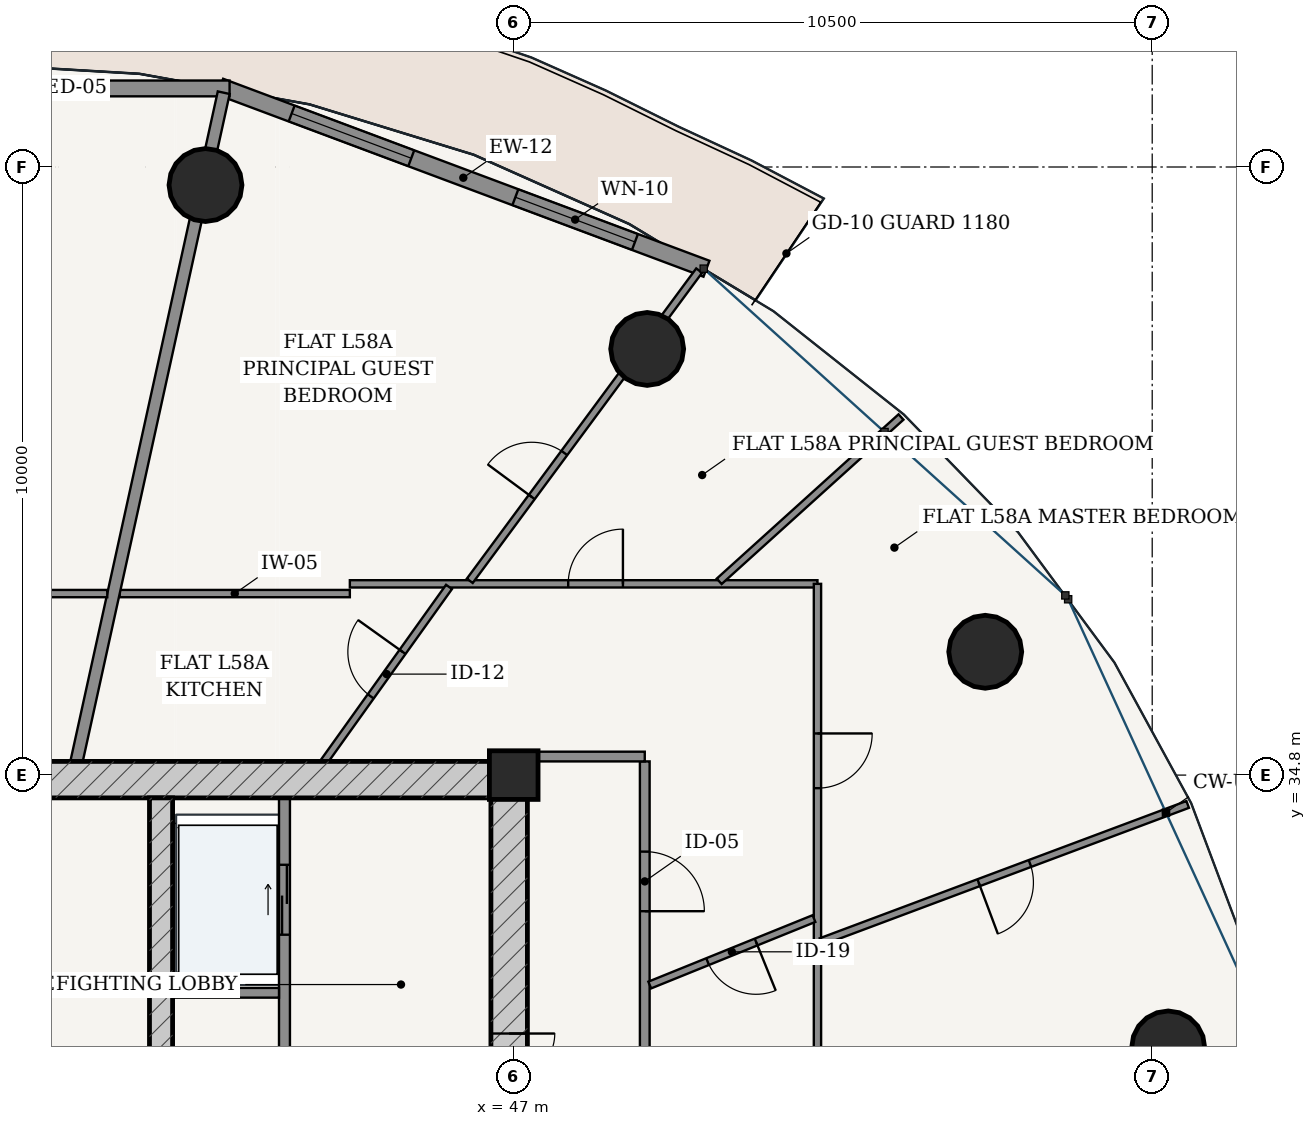
"""IFC4 building model, lengths in metres.
Left out: names, types, materials, properties, quantities, classifications, styles, units other than length and angle.
Written with IfcOpenShell. Run it as: python <this file> out.ifc"""

import sys

from ifc_helpers import new_model, si_unit, direction, frame, frame_2d, origin, origin_2d, place, context, subcontext, project, spatial, rectangle, hollow_circle, extrude, source, transform, mapped, element, fill, save


model = new_model("IFC4")
c1 = context("Model", 3, precision=1e-05, world=origin(), true_north=direction((-0.2419218956, 0.970295726276)))
c2 = subcontext(c1, "Body", "Model", "MODEL_VIEW")
j1 = project(units=[si_unit("LENGTHUNIT", "METRE"), si_unit("PLANEANGLEUNIT", "RADIAN")], contexts=[c1])
p1 = place(None, origin())
s1 = spatial("IfcSite", under=j1, at=p1, CompositionType="ELEMENT")
p2 = place(p1, origin())
s2 = spatial("IfcBuilding", under=s1, at=p2, CompositionType="ELEMENT")
p3 = place(p2, frame((0.0, 0.0, 220.8)))
s3 = spatial("IfcBuildingStorey", under=s2, at=p3, CompositionType="ELEMENT", Elevation=220.8)
p4 = place(p3, frame((47.0, 34.8, 0.0), z_axis=(0.0, 0.0, 1.0), x_axis=(1.0, 0.0, 0.0)))
e1 = element("IfcColumn", 1, at=p4, inside=s3, PredefinedType="COLUMN", context=c2, shape_type="SweptSolid", body=[
    extrude(rectangle(XDim=0.8, YDim=0.8, at=origin_2d()), origin(), (0.0, 0.0, 1.0), 3.7),
])
p5 = place(p3, frame((28.775, 34.725, 0.0), z_axis=(0.0, 0.0, 1.0), x_axis=(1.0, 0.0, 0.0)))
e2 = element("IfcWall", 2, at=p5, inside=s3, PredefinedType="SHEAR", context=c2, shape_type="SweptSolid", body=[
    extrude(rectangle(XDim=18.45, YDim=0.6, at=frame_2d((9.225, 0.0))), origin(), (0.0, 0.0, 1.0), 3.435),
])
p6 = place(p3, frame((46.925, 19.175, 0.0), z_axis=(0.0, 0.0, 1.0), x_axis=(0.0, 1.0, 0.0)))
e3 = element("IfcWall", 3, at=p6, inside=s3, PredefinedType="SHEAR", context=c2, shape_type="SweptSolid", body=[
    extrude(rectangle(XDim=15.25, YDim=0.6, at=frame_2d((7.625, 0.0))), origin(), (0.0, 0.0, 1.0), 3.435),
])
p7 = place(p6, frame((9.875, 0.0, 0.0)))
e4 = element("IfcOpeningElement", 4, at=p7, cuts=e3, PredefinedType="OPENING", context=c2, shape_type="SweptSolid", body=[
    extrude(rectangle(XDim=1.5, YDim=2.2, at=frame_2d((0.75, 1.1))), frame((0.0, 0.31, 0.0), z_axis=(0.0, -1.0, 0.0), x_axis=(1.0, 0.0, 0.0)), (0.0, 0.0, 1.0), 0.62),
])
p8 = place(p3, frame((41.2, 19.175, 0.0), z_axis=(0.0, 0.0, 1.0), x_axis=(0.0, 1.0, 0.0)))
e5 = element("IfcWall", 5, at=p8, inside=s3, PredefinedType="SHEAR", context=c2, shape_type="SweptSolid", body=[
    extrude(rectangle(XDim=15.25, YDim=0.38, at=frame_2d((7.625, 0.0))), origin(), (0.0, 0.0, 1.0), 3.435),
])
p9 = place(p8, frame((7.8, 0.0, 0.0)))
e6 = element("IfcOpeningElement", 6, at=p9, cuts=e5, PredefinedType="OPENING", context=c2, shape_type="SweptSolid", body=[
    extrude(rectangle(XDim=1.05, YDim=2.15, at=frame_2d((0.525, 1.075))), frame((0.0, 0.2, 0.0), z_axis=(0.0, -1.0, 0.0), x_axis=(1.0, 0.0, 0.0)), (0.0, 0.0, 1.0), 0.4),
])
for number, where, z_axis, x_axis in (
    (7, (57.763, 30.321, 0.0), (0.0, 0.0, 1.0), (1.0, 0.0, 0.0)),
    (8, (54.754, 36.828, 0.0), (0.0, 0.0, 1.0), (1.0, 0.0, 0.0)),
    (9, (49.195, 41.808, 0.0), (0.0, 0.0, 1.0), (1.0, 0.0, 0.0)),
    (10, (41.931, 44.503, 0.0), (0.0, 0.0, 1.0), (1.0, 0.0, 0.0)),
):
    element("IfcColumn", number, at=place(p3, frame(where, z_axis=z_axis, x_axis=x_axis)), inside=s3, PredefinedType="COLUMN", context=c2, shape_type="SweptSolid", body=[
        extrude(hollow_circle(Radius=0.6, WallThickness=0.038, at=origin_2d()), origin(), (0.0, 0.0, 1.0), 3.7),
    ])
p10 = place(p3, frame((50.17, 43.127, 0.0), z_axis=(0.0, 0.0, 1.0), x_axis=(-0.936556918375, 0.350515532672, 0.0)))
e11 = element("IfcWall", 11, at=p10, inside=s3, PredefinedType="SOLIDWALL", context=c2, shape_type="SweptSolid", body=[
    extrude(rectangle(XDim=8.539, YDim=0.28, at=frame_2d((4.27, 0.0))), origin(), (0.0, 0.0, 1.0), 3.435),
])
p11 = place(p10, frame((1.256, 0.0, 0.85)))
e12 = element("IfcOpeningElement", 12, at=p11, cuts=e11, PredefinedType="OPENING", context=c2, shape_type="SweptSolid", body=[
    extrude(rectangle(XDim=2.1, YDim=1.95, at=frame_2d((1.05, 0.975))), frame((0.0, 0.15, 0.0), z_axis=(0.0, -1.0, 0.0), x_axis=(1.0, 0.0, 0.0)), (0.0, 0.0, 1.0), 0.3),
])
p12 = place(p10, frame((5.184, 0.0, 0.85)))
e13 = element("IfcOpeningElement", 13, at=p12, cuts=e11, PredefinedType="OPENING", context=c2, shape_type="SweptSolid", body=[
    extrude(rectangle(XDim=2.1, YDim=1.95, at=frame_2d((1.05, 0.975))), frame((0.0, 0.15, 0.0), z_axis=(0.0, -1.0, 0.0), x_axis=(1.0, 0.0, 0.0)), (0.0, 0.0, 1.0), 0.3),
])
p13 = place(p3, frame((42.327, 46.092, 0.0), z_axis=(0.0, 0.0, 1.0), x_axis=(-1.0, 0.0, 0.0)))
e14 = element("IfcWall", 14, at=p13, inside=s3, PredefinedType="SOLIDWALL", context=c2, shape_type="SweptSolid", body=[
    extrude(rectangle(XDim=8.654, YDim=0.26, at=frame_2d((4.327, 0.0))), origin(), (0.0, 0.0, 1.0), 3.435),
])
p14 = place(p13, frame((3.652, 0.0, 0.0)))
e15 = element("IfcOpeningElement", 15, at=p14, cuts=e14, PredefinedType="OPENING", context=c2, shape_type="SweptSolid", body=[
    extrude(rectangle(XDim=1.35, YDim=2.2, at=frame_2d((0.675, 1.1))), frame((0.0, 0.14, 0.0), z_axis=(0.0, -1.0, 0.0), x_axis=(1.0, 0.0, 0.0)), (0.0, 0.0, 1.0), 0.28),
])
p15 = place(p3, frame((43.23, 28.52, 0.0), z_axis=(0.0, 0.0, 1.0), x_axis=(0.0, 1.0, 0.0)))
e16 = element("IfcWall", 16, at=p15, inside=s3, PredefinedType="PARTITIONING", context=c2, shape_type="SweptSolid", body=[
    extrude(rectangle(XDim=5.905, YDim=0.18, at=frame_2d((2.953, 0.0))), origin(), (0.0, 0.0, 1.0), 3.435),
])
p16 = place(p15, frame((0.905, 0.0, 0.0)))
e17 = element("IfcOpeningElement", 17, at=p16, cuts=e16, PredefinedType="OPENING", context=c2, shape_type="SweptSolid", body=[
    extrude(rectangle(XDim=0.85, YDim=2.1, at=frame_2d((0.425, 1.05))), frame((0.0, 0.1, 0.0), z_axis=(0.0, -1.0, 0.0), x_axis=(1.0, 0.0, 0.0)), (0.0, 0.0, 1.0), 0.2),
])
p17 = place(p15, frame((3.655, 0.0, 0.0)))
e18 = element("IfcOpeningElement", 18, at=p17, cuts=e16, PredefinedType="OPENING", context=c2, shape_type="SweptSolid", body=[
    extrude(rectangle(XDim=1.15, YDim=2.2, at=frame_2d((0.575, 1.1))), frame((0.0, 0.1, 0.0), z_axis=(0.0, -1.0, 0.0), x_axis=(1.0, 0.0, 0.0)), (0.0, 0.0, 1.0), 0.2),
])
p18 = place(p3, frame((41.39, 31.22, 0.0), z_axis=(0.0, 0.0, 1.0), x_axis=(1.0, 0.0, 0.0)))
e19 = element("IfcWall", 19, at=p18, inside=s3, PredefinedType="PARTITIONING", context=c2, shape_type="SweptSolid", body=[
    extrude(rectangle(XDim=1.75, YDim=0.16, at=frame_2d((0.875, 0.0))), origin(), (0.0, 0.0, 1.0), 3.435),
])
p19 = place(p3, frame((49.155, 16.725, 0.0), z_axis=(0.0, 0.0, 1.0), x_axis=(0.0, 1.0, 0.0)))
e20 = element("IfcWall", 20, at=p19, inside=s3, PredefinedType="PARTITIONING", context=c2, shape_type="SweptSolid", body=[
    extrude(rectangle(XDim=18.3, YDim=0.16, at=frame_2d((9.15, 0.0))), origin(), (0.0, 0.0, 1.0), 2.951),
])
p20 = place(p19, frame((15.837, 0.0, 0.0)))
e21 = element("IfcOpeningElement", 21, at=p20, cuts=e20, PredefinedType="OPENING", context=c2, shape_type="SweptSolid", body=[
    extrude(rectangle(XDim=0.98, YDim=2.2, at=frame_2d((0.49, 1.1))), frame((0.0, 0.09, 0.0), z_axis=(0.0, -1.0, 0.0), x_axis=(1.0, 0.0, 0.0)), (0.0, 0.0, 1.0), 0.18),
])
p21 = place(p3, frame((47.225, 35.105, 0.0), z_axis=(0.0, 0.0, 1.0), x_axis=(1.0, 0.0, 0.0)))
e22 = element("IfcWall", 22, at=p21, inside=s3, PredefinedType="PARTITIONING", context=c2, shape_type="SweptSolid", body=[
    extrude(rectangle(XDim=1.93, YDim=0.16, at=frame_2d((0.965, 0.0))), origin(), (0.0, 0.0, 1.0), 3.435),
])
p22 = place(p3, frame((40.52, 37.785, 0.0), z_axis=(0.0, 0.0, 1.0), x_axis=(1.0, 0.0, 0.0)))
e23 = element("IfcWall", 23, at=p22, inside=s3, PredefinedType="PARTITIONING", context=c2, shape_type="SweptSolid", body=[
    extrude(rectangle(XDim=3.785, YDim=0.12, at=frame_2d((1.893, 0.0))), origin(), (0.0, 0.0, 1.0), 2.951),
])
p23 = place(p3, frame((44.305, 37.945, 0.0), z_axis=(0.0, 0.0, 1.0), x_axis=(1.0, 0.0, 0.0)))
e24 = element("IfcWall", 24, at=p23, inside=s3, PredefinedType="PARTITIONING", context=c2, shape_type="SweptSolid", body=[
    extrude(rectangle(XDim=7.69, YDim=0.12, at=frame_2d((3.845, 0.0))), origin(), (0.0, 0.0, 1.0), 2.951),
])
p24 = place(p23, frame((3.591, 0.0, 0.0)))
e25 = element("IfcOpeningElement", 25, at=p24, cuts=e24, PredefinedType="OPENING", context=c2, shape_type="SweptSolid", body=[
    extrude(rectangle(XDim=0.9, YDim=2.15, at=frame_2d((0.45, 1.075))), frame((0.0, 0.07, 0.0), z_axis=(0.0, -1.0, 0.0), x_axis=(1.0, 0.0, 0.0)), (0.0, 0.0, 1.0), 0.14),
])
p25 = place(p3, frame((51.995, 37.945, 0.0), z_axis=(0.0, 0.0, 1.0), x_axis=(0.0, -1.0, 0.0)))
e26 = element("IfcWall", 26, at=p25, inside=s3, PredefinedType="PARTITIONING", context=c2, shape_type="SweptSolid", body=[
    extrude(rectangle(XDim=11.043, YDim=0.12, at=frame_2d((5.521, 0.0))), origin(), (0.0, 0.0, 1.0), 2.951),
])
p26 = place(p25, frame((2.46, 0.0, 0.0)))
e27 = element("IfcOpeningElement", 27, at=p26, cuts=e26, PredefinedType="OPENING", context=c2, shape_type="SweptSolid", body=[
    extrude(rectangle(XDim=0.9, YDim=2.15, at=frame_2d((0.45, 1.075))), frame((0.0, 0.07, 0.0), z_axis=(0.0, -1.0, 0.0), x_axis=(1.0, 0.0, 0.0)), (0.0, 0.0, 1.0), 0.14),
])
p27 = place(p3, frame((52.053, 32.06, 0.0), z_axis=(0.0, 0.0, 1.0), x_axis=(0.936547148815, 0.350541635255, 0.0)))
e28 = element("IfcWall", 28, at=p27, inside=s3, PredefinedType="PARTITIONING", context=c2, shape_type="SweptSolid", body=[
    extrude(rectangle(XDim=6.439, YDim=0.12, at=frame_2d((3.219, 0.0))), origin(), (0.0, 0.0, 1.0), 2.951),
])
p28 = place(p27, frame((2.769, 0.0, 0.0)))
e29 = element("IfcOpeningElement", 29, at=p28, cuts=e28, PredefinedType="OPENING", context=c2, shape_type="SweptSolid", body=[
    extrude(rectangle(XDim=0.9, YDim=2.15, at=frame_2d((0.45, 1.075))), frame((0.0, 0.07, 0.0), z_axis=(0.0, -1.0, 0.0), x_axis=(1.0, 0.0, 0.0)), (0.0, 0.0, 1.0), 0.14),
])
p29 = place(p3, frame((50.379, 37.987, 0.0), z_axis=(0.0, 0.0, 1.0), x_axis=(0.741946116474, 0.67045951425, 0.0)))
e30 = element("IfcWall", 30, at=p29, inside=s3, PredefinedType="PARTITIONING", context=c2, shape_type="SweptSolid", body=[
    extrude(rectangle(XDim=4.03, YDim=0.12, at=frame_2d((2.015, 0.0))), origin(), (0.0, 0.0, 1.0), 2.951),
])
p30 = place(p3, frame((46.278, 37.995, 0.0), z_axis=(0.0, 0.0, 1.0), x_axis=(0.594518724985, 0.80408176552, 0.0)))
e31 = element("IfcWall", 31, at=p30, inside=s3, PredefinedType="PARTITIONING", context=c2, shape_type="SweptSolid", body=[
    extrude(rectangle(XDim=6.344, YDim=0.12, at=frame_2d((3.172, 0.0))), origin(), (0.0, 0.0, 1.0), 2.951),
])
p31 = place(p30, frame((1.715, 0.0, 0.0)))
e32 = element("IfcOpeningElement", 32, at=p31, cuts=e31, PredefinedType="OPENING", context=c2, shape_type="SweptSolid", body=[
    extrude(rectangle(XDim=0.9, YDim=2.15, at=frame_2d((0.45, 1.075))), frame((0.0, 0.07, 0.0), z_axis=(0.0, -1.0, 0.0), x_axis=(1.0, 0.0, 0.0)), (0.0, 0.0, 1.0), 0.14),
])
p32 = place(p3, frame((49.237, 31.347, 0.0), z_axis=(0.0, 0.0, 1.0), x_axis=(0.926960690293, 0.375158471383, 0.0)))
e33 = element("IfcWall", 33, at=p32, inside=s3, PredefinedType="PARTITIONING", context=c2, shape_type="SweptSolid", body=[
    extrude(rectangle(XDim=2.914, YDim=0.12, at=frame_2d((1.457, 0.0))), origin(), (0.0, 0.0, 1.0), 3.11),
])
p33 = place(p32, frame((1.027, 0.0, 0.0)))
e34 = element("IfcOpeningElement", 34, at=p33, cuts=e33, PredefinedType="OPENING", context=c2, shape_type="SweptSolid", body=[
    extrude(rectangle(XDim=0.86, YDim=2.15, at=frame_2d((0.43, 1.075))), frame((0.0, 0.07, 0.0), z_axis=(0.0, -1.0, 0.0), x_axis=(1.0, 0.0, 0.0)), (0.0, 0.0, 1.0), 0.14),
])
p34 = place(p3, frame((43.885, 35.027, 0.0), z_axis=(0.0, 0.0, 1.0), x_axis=(0.581801309538, 0.813330951225, 0.0)))
e35 = element("IfcWall", 35, at=p34, inside=s3, PredefinedType="PARTITIONING", context=c2, shape_type="SweptSolid", body=[
    extrude(rectangle(XDim=3.526, YDim=0.12, at=frame_2d((1.763, 0.0))), origin(), (0.0, 0.0, 1.0), 3.435),
])
p35 = place(p34, frame((1.313, 0.0, 0.0)))
e36 = element("IfcOpeningElement", 36, at=p35, cuts=e35, PredefinedType="OPENING", context=c2, shape_type="SweptSolid", body=[
    extrude(rectangle(XDim=0.9, YDim=2.15, at=frame_2d((0.45, 1.075))), frame((0.0, 0.07, 0.0), z_axis=(0.0, -1.0, 0.0), x_axis=(1.0, 0.0, 0.0)), (0.0, 0.0, 1.0), 0.14),
])
p36 = place(p3, frame((39.811, 35.027, 0.0), z_axis=(0.0, 0.0, 1.0), x_axis=(0.214966857327, 0.976621344356, 0.0)))
e37 = element("IfcWall", 37, at=p36, inside=s3, PredefinedType="PARTITIONING", context=c2, shape_type="SweptSolid", body=[
    extrude(rectangle(XDim=11.258, YDim=0.2, at=frame_2d((5.629, 0.0))), origin(), (0.0, 0.0, 1.0), 2.52),
])
p37 = place(p3, frame((31.695, 37.785, 0.0), z_axis=(0.0, 0.0, 1.0), x_axis=(1.0, 0.0, 0.0)))
e38 = element("IfcWall", 38, at=p37, inside=s3, PredefinedType="PARTITIONING", context=c2, shape_type="SweptSolid", body=[
    extrude(rectangle(XDim=8.621, YDim=0.12, at=frame_2d((4.311, 0.0))), origin(), (0.0, 0.0, 1.0), 2.951),
])
p38 = place(p37, frame((1.716, 0.0, 0.0)))
e39 = element("IfcOpeningElement", 39, at=p38, cuts=e38, PredefinedType="OPENING", context=c2, shape_type="SweptSolid", body=[
    extrude(rectangle(XDim=0.9, YDim=2.15, at=frame_2d((0.45, 1.075))), frame((0.0, 0.07, 0.0), z_axis=(0.0, -1.0, 0.0), x_axis=(1.0, 0.0, 0.0)), (0.0, 0.0, 1.0), 0.14),
])
p39 = place(p37, frame((5.784, 0.0, 0.0)))
e40 = element("IfcOpeningElement", 40, at=p39, cuts=e38, PredefinedType="OPENING", context=c2, shape_type="SweptSolid", body=[
    extrude(rectangle(XDim=0.9, YDim=2.15, at=frame_2d((0.45, 1.075))), frame((0.0, 0.07, 0.0), z_axis=(0.0, -1.0, 0.0), x_axis=(1.0, 0.0, 0.0)), (0.0, 0.0, 1.0), 0.14),
])
m1 = source(origin(), c2, "Body", "SweptSolid", [
    extrude(rectangle(XDim=2.1, YDim=1.95, at=frame_2d((1.05, 0.975))), frame((0.0, 0.03, 0.0), z_axis=(0.0, -1.0, 0.0), x_axis=(1.0, 0.0, 0.0)), (0.0, 0.0, 1.0), 0.06),
])
p40 = place(p11, origin())
e41 = element("IfcWindow", 41, at=p40, inside=s3, PartitioningType="SINGLE_PANEL", PredefinedType="WINDOW", context=c2, shape_type="MappedRepresentation", body=[
    mapped(m1, transform((0.0, 0.0, 0.0), scale=1.0)),
])
fill(e12, e41)
p41 = place(p12, origin())
e42 = element("IfcWindow", 42, at=p41, inside=s3, PartitioningType="SINGLE_PANEL", PredefinedType="WINDOW", context=c2, shape_type="MappedRepresentation", body=[
    mapped(m1, transform((0.0, 0.0, 0.0), scale=1.0)),
])
fill(e13, e42)
m2 = source(origin(), c2, "Body", "SweptSolid", [
    extrude(rectangle(XDim=1.5, YDim=2.2, at=frame_2d((0.75, 1.1))), frame((0.0, 0.025, 0.0), z_axis=(0.0, -1.0, 0.0), x_axis=(1.0, 0.0, 0.0)), (0.0, 0.0, 1.0), 0.05),
])
p42 = place(p7, frame((1.5, 0.0, 0.0), z_axis=(0.0, 0.0, 1.0), x_axis=(-1.0, 0.0, 0.0)))
e43 = element("IfcDoor", 43, at=p42, inside=s3, OperationType="DOUBLE_DOOR_SINGLE_SWING", PredefinedType="DOOR", context=c2, shape_type="MappedRepresentation", body=[
    mapped(m2, transform((0.0, 0.0, 0.0), scale=1.0)),
])
fill(e4, e43)
m3 = source(origin(), c2, "Body", "SweptSolid", [
    extrude(rectangle(XDim=1.15, YDim=2.2, at=frame_2d((0.575, 1.1))), frame((0.0, 0.025, 0.0), z_axis=(0.0, -1.0, 0.0), x_axis=(1.0, 0.0, 0.0)), (0.0, 0.0, 1.0), 0.05),
])
p43 = place(p17, origin())
e44 = element("IfcDoor", 44, at=p43, inside=s3, OperationType="DOUBLE_DOOR_SLIDING", PredefinedType="DOOR", context=c2, shape_type="MappedRepresentation", body=[
    mapped(m3, transform((0.0, 0.0, 0.0), scale=1.0)),
])
fill(e18, e44)
m4 = source(origin(), c2, "Body", "SweptSolid", [
    extrude(rectangle(XDim=0.98, YDim=2.2, at=frame_2d((0.49, 1.1))), frame((0.0, 0.025, 0.0), z_axis=(0.0, -1.0, 0.0), x_axis=(1.0, 0.0, 0.0)), (0.0, 0.0, 1.0), 0.05),
])
p44 = place(p20, frame((0.98, 0.0, 0.0), z_axis=(0.0, 0.0, 1.0), x_axis=(-1.0, 0.0, 0.0)))
e45 = element("IfcDoor", 45, at=p44, inside=s3, OperationType="SINGLE_SWING_RIGHT", PredefinedType="DOOR", context=c2, shape_type="MappedRepresentation", body=[
    mapped(m4, transform((0.0, 0.0, 0.0), scale=1.0)),
])
fill(e21, e45)
m5 = source(origin(), c2, "Body", "SweptSolid", [
    extrude(rectangle(XDim=0.86, YDim=2.15, at=frame_2d((0.43, 1.075))), frame((0.0, 0.025, 0.0), z_axis=(0.0, -1.0, 0.0), x_axis=(1.0, 0.0, 0.0)), (0.0, 0.0, 1.0), 0.05),
])
p45 = place(p33, frame((0.86, 0.0, 0.0), z_axis=(0.0, 0.0, 1.0), x_axis=(-1.0, 0.0, 0.0)))
e46 = element("IfcDoor", 46, at=p45, inside=s3, OperationType="SINGLE_SWING_LEFT", PredefinedType="DOOR", context=c2, shape_type="MappedRepresentation", body=[
    mapped(m5, transform((0.0, 0.0, 0.0), scale=1.0)),
])
fill(e34, e46)
m6 = source(origin(), c2, "Body", "SweptSolid", [
    extrude(rectangle(XDim=0.9, YDim=2.15, at=frame_2d((0.45, 1.075))), frame((0.0, 0.025, 0.0), z_axis=(0.0, -1.0, 0.0), x_axis=(1.0, 0.0, 0.0)), (0.0, 0.0, 1.0), 0.05),
])
p46 = place(p35, origin())
e47 = element("IfcDoor", 47, at=p46, inside=s3, OperationType="SINGLE_SWING_RIGHT", PredefinedType="DOOR", context=c2, shape_type="MappedRepresentation", body=[
    mapped(m6, transform((0.0, 0.0, 0.0), scale=1.0)),
])
fill(e36, e47)
p47 = place(p26, origin())
e48 = element("IfcDoor", 48, at=p47, inside=s3, OperationType="SINGLE_SWING_LEFT", PredefinedType="DOOR", context=c2, shape_type="MappedRepresentation", body=[
    mapped(m6, transform((0.0, 0.0, 0.0), scale=1.0)),
])
fill(e27, e48)
p48 = place(p24, origin())
e49 = element("IfcDoor", 49, at=p48, inside=s3, OperationType="SINGLE_SWING_RIGHT", PredefinedType="DOOR", context=c2, shape_type="MappedRepresentation", body=[
    mapped(m6, transform((0.0, 0.0, 0.0), scale=1.0)),
])
fill(e25, e49)
p49 = place(p31, origin())
e50 = element("IfcDoor", 50, at=p49, inside=s3, OperationType="SINGLE_SWING_LEFT", PredefinedType="DOOR", context=c2, shape_type="MappedRepresentation", body=[
    mapped(m6, transform((0.0, 0.0, 0.0), scale=1.0)),
])
fill(e32, e50)
p50 = place(p28, frame((0.9, 0.0, 0.0), z_axis=(0.0, 0.0, 1.0), x_axis=(-1.0, 0.0, 0.0)))
e51 = element("IfcDoor", 51, at=p50, inside=s3, OperationType="SINGLE_SWING_RIGHT", PredefinedType="DOOR", context=c2, shape_type="MappedRepresentation", body=[
    mapped(m6, transform((0.0, 0.0, 0.0), scale=1.0)),
])
fill(e29, e51)
save(model, sys.argv[1])
